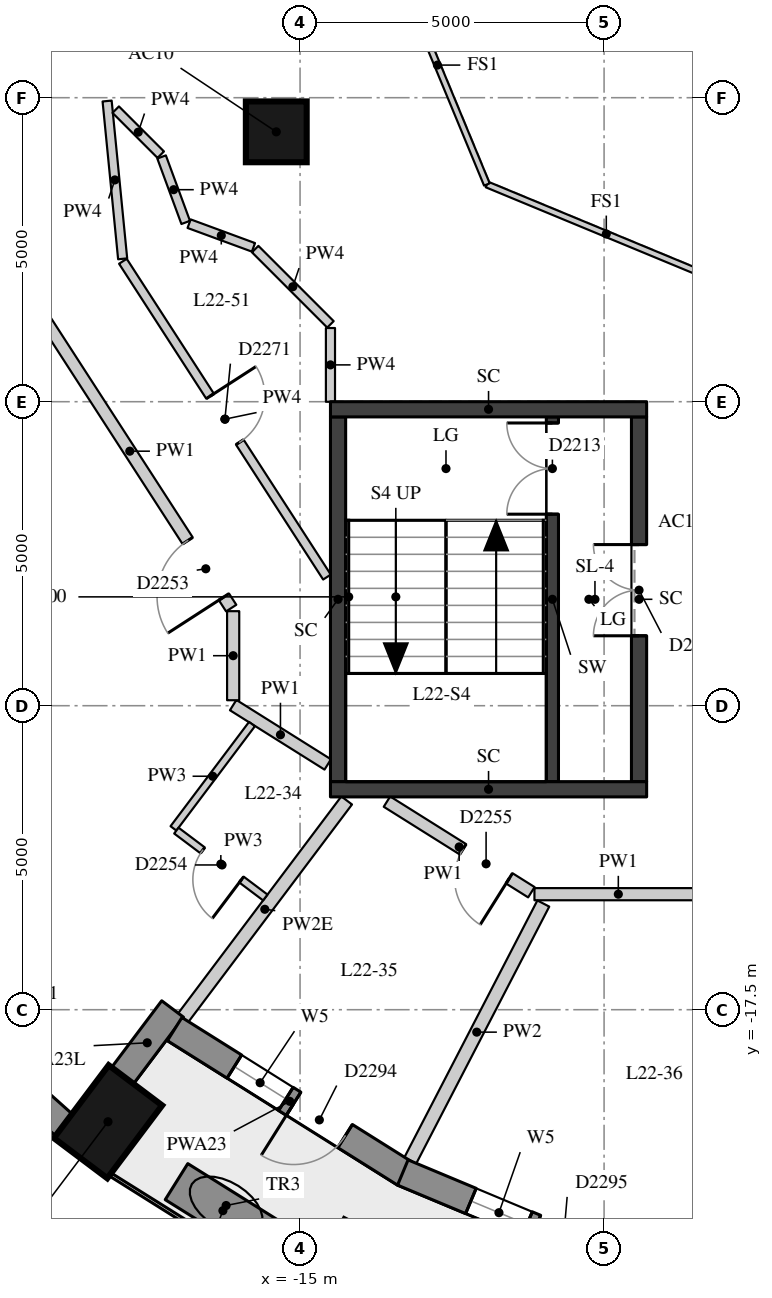
"""IFC4 building model, lengths in metres.
Left out: names, types, materials, properties, quantities, classifications, styles, units other than length and angle.
Written with IfcOpenShell. Run it as: python <this file> out.ifc"""

import sys

from ifc_helpers import new_model, si_unit, direction, frame, frame_2d, origin, origin_2d, place, context, subcontext, project, spatial, rectangle, extrude, element, fill, save


model = new_model("IFC4")
c1 = context("Model", 3, precision=1e-05, world=origin(), true_north=direction((0.0, 1.0)))
c2 = subcontext(c1, "Body", "Model", "MODEL_VIEW")
j1 = project(units=[si_unit("LENGTHUNIT", "METRE"), si_unit("PLANEANGLEUNIT", "RADIAN")], contexts=[c1])
p1 = place(None, origin())
s1 = spatial("IfcSite", under=j1, at=p1, CompositionType="ELEMENT")
p2 = place(p1, origin())
s2 = spatial("IfcBuilding", under=s1, at=p2, CompositionType="ELEMENT")
p3 = place(p2, frame((0.0, 0.0, 81.1)))
s3 = spatial("IfcBuildingStorey", under=s2, at=p3, CompositionType="ELEMENT", Elevation=81.1)
p4 = place(p3, frame((-18.159, -19.343, 0.0), z_axis=(0.0, 0.0, 1.0), x_axis=(-0.601173783055, -0.79911831575, 0.0)))
e1 = element("IfcColumn", 1, at=p4, inside=s3, PredefinedType="COLUMN", context=c2, shape_type="SweptSolid", body=[
    extrude(rectangle(XDim=1.5, YDim=1.1, at=origin_2d()), origin(), (0.0, 0.0, 1.0), 3.3),
])
p5 = place(p3, frame((-15.391, -3.062, 0.0), z_axis=(0.0, 0.0, 1.0), x_axis=(1.0, 0.0, 0.0)))
e2 = element("IfcColumn", 2, at=p5, inside=s3, PredefinedType="COLUMN", context=c2, shape_type="SweptSolid", body=[
    extrude(rectangle(XDim=1.0, YDim=1.0, at=origin_2d()), origin(), (0.0, 0.0, 1.0), 3.3),
])
p6 = place(p3, frame((-21.627, -16.943, 0.0), z_axis=(0.0, 0.0, 1.0), x_axis=(0.745526233716, -0.66647628228, 0.0)))
e3 = element("IfcWall", 3, at=p6, inside=s3, PredefinedType="SOLIDWALL", context=c2, shape_type="SweptSolid", body=[
    extrude(rectangle(XDim=3.697, YDim=0.45, at=frame_2d((1.848, 0.0))), origin(), (0.0, 0.0, 1.0), 2.85),
])
p7 = place(p6, frame((0.749, 0.0, 0.4)))
e4 = element("IfcOpeningElement", 4, at=p7, cuts=e3, PredefinedType="OPENING", context=c2, shape_type="SweptSolid", body=[
    extrude(rectangle(XDim=2.2, YDim=1.75, at=frame_2d((1.1, 0.875))), frame((0.0, 0.235, 0.0), z_axis=(0.0, -1.0, 0.0), x_axis=(1.0, 0.0, 0.0)), (0.0, 0.0, 1.0), 0.47),
])
p8 = place(p3, frame((-17.932, -18.6, 0.0), z_axis=(0.0, 0.0, 1.0), x_axis=(0.601262851241, 0.799051302306, 0.0)))
e5 = element("IfcWall", 5, at=p8, inside=s3, PredefinedType="SOLIDWALL", context=c2, shape_type="SweptSolid", body=[
    extrude(rectangle(XDim=1.391, YDim=0.45, at=frame_2d((0.696, 0.0))), origin(), (0.0, 0.0, 1.0), 2.4),
])
p9 = place(p3, frame((-17.062, -17.819, 0.0), z_axis=(0.0, 0.0, 1.0), x_axis=(0.846990101364, -0.531608660757, 0.0)))
e6 = element("IfcWall", 6, at=p9, inside=s3, PredefinedType="SOLIDWALL", context=c2, shape_type="SweptSolid", body=[
    extrude(rectangle(XDim=4.469, YDim=0.45, at=frame_2d((2.234, 0.0))), origin(), (0.0, 0.0, 1.0), 2.85),
])
p10 = place(p9, frame((1.159, 0.0, 0.4)))
e7 = element("IfcOpeningElement", 7, at=p10, cuts=e6, PredefinedType="OPENING", context=c2, shape_type="SweptSolid", body=[
    extrude(rectangle(XDim=1.0, YDim=1.75, at=frame_2d((0.5, 0.875))), frame((0.0, 0.235, 0.0), z_axis=(0.0, -1.0, 0.0), x_axis=(1.0, 0.0, 0.0)), (0.0, 0.0, 1.0), 0.47),
])
p11 = place(p9, frame((2.31, 0.0, 0.0)))
e8 = element("IfcOpeningElement", 8, at=p11, cuts=e6, PredefinedType="OPENING", context=c2, shape_type="SweptSolid", body=[
    extrude(rectangle(XDim=1.0, YDim=2.15, at=frame_2d((0.5, 1.075))), frame((0.0, 0.235, 0.0), z_axis=(0.0, -1.0, 0.0), x_axis=(1.0, 0.0, 0.0)), (0.0, 0.0, 1.0), 0.47),
])
p12 = place(p3, frame((-13.31, -20.178, 0.0), z_axis=(0.0, 0.0, 1.0), x_axis=(0.922634412489, -0.385675693935, 0.0)))
e9 = element("IfcWall", 9, at=p12, inside=s3, PredefinedType="SOLIDWALL", context=c2, shape_type="SweptSolid", body=[
    extrude(rectangle(XDim=4.577, YDim=0.45, at=frame_2d((2.288, 0.0))), origin(), (0.0, 0.0, 1.0), 2.85),
])
p13 = place(p12, frame((1.213, 0.0, 0.4)))
e10 = element("IfcOpeningElement", 10, at=p13, cuts=e9, PredefinedType="OPENING", context=c2, shape_type="SweptSolid", body=[
    extrude(rectangle(XDim=1.0, YDim=1.75, at=frame_2d((0.5, 0.875))), frame((0.0, 0.235, 0.0), z_axis=(0.0, -1.0, 0.0), x_axis=(1.0, 0.0, 0.0)), (0.0, 0.0, 1.0), 0.47),
])
p14 = place(p12, frame((2.363, 0.0, 0.0)))
e11 = element("IfcOpeningElement", 11, at=p14, cuts=e9, PredefinedType="OPENING", context=c2, shape_type="SweptSolid", body=[
    extrude(rectangle(XDim=1.0, YDim=2.15, at=frame_2d((0.5, 1.075))), frame((0.0, 0.235, 0.0), z_axis=(0.0, -1.0, 0.0), x_axis=(1.0, 0.0, 0.0)), (0.0, 0.0, 1.0), 0.47),
])
p15 = place(p3, frame((-17.032, -20.328, 0.0), z_axis=(0.0, 0.0, 1.0), x_axis=(0.847609446823, -0.530620604252, 0.0)))
e12 = element("IfcWall", 12, at=p15, inside=s3, PredefinedType="USERDEFINED", context=c2, shape_type="SweptSolid", body=[
    extrude(rectangle(XDim=1.8, YDim=0.7, at=frame_2d((0.9, 0.0))), origin(), (0.0, 0.0, 1.0), 0.75),
])
p16 = place(p3, frame((-10.85, -13.75, 0.0), z_axis=(0.0, 0.0, 1.0), x_axis=(0.0, 1.0, 0.0)))
e13 = element("IfcWall", 13, at=p16, inside=s3, PredefinedType="SHEAR", context=c2, shape_type="SweptSolid", body=[
    extrude(rectangle(XDim=6.0, YDim=0.2, at=frame_2d((3.0, 0.0))), origin(), (0.0, 0.0, 1.0), 2.85),
])
p17 = place(p16, frame((4.4, 0.0, 0.0)))
e14 = element("IfcOpeningElement", 14, at=p17, cuts=e13, PredefinedType="OPENING", context=c2, shape_type="SweptSolid", body=[
    extrude(rectangle(XDim=1.5, YDim=2.1, at=frame_2d((0.75, 1.05))), frame((0.0, 0.11, 0.0), z_axis=(0.0, -1.0, 0.0), x_axis=(1.0, 0.0, 0.0)), (0.0, 0.0, 1.0), 0.22),
])
p18 = place(p3, frame((-14.375, -13.75, -0.28), z_axis=(0.0, 0.0, 1.0), x_axis=(0.0, 1.0, 0.0)))
e15 = element("IfcWall", 15, at=p18, inside=s3, PredefinedType="SHEAR", context=c2, shape_type="SweptSolid", body=[
    extrude(rectangle(XDim=6.0, YDim=0.25, at=frame_2d((3.0, 0.0))), origin(), (0.0, 0.0, 1.0), 3.13),
])
p19 = place(p3, frame((-9.425, -13.75, -0.28), z_axis=(0.0, 0.0, 1.0), x_axis=(0.0, 1.0, 0.0)))
e16 = element("IfcWall", 16, at=p19, inside=s3, PredefinedType="SHEAR", context=c2, shape_type="SweptSolid", body=[
    extrude(rectangle(XDim=6.0, YDim=0.25, at=frame_2d((3.0, 0.0))), origin(), (0.0, 0.0, 1.0), 3.13),
])
p20 = place(p19, frame((2.4, 0.0, 0.28)))
e17 = element("IfcOpeningElement", 17, at=p20, cuts=e16, PredefinedType="OPENING", context=c2, shape_type="SweptSolid", body=[
    extrude(rectangle(XDim=1.5, YDim=2.1, at=frame_2d((0.75, 1.05))), frame((0.0, 0.135, 0.0), z_axis=(0.0, -1.0, 0.0), x_axis=(1.0, 0.0, 0.0)), (0.0, 0.0, 1.0), 0.27),
])
for number, where, z_axis, x_axis in (
    (18, (-14.5, -7.625, -0.28), (0.0, 0.0, 1.0), (1.0, 0.0, 0.0)),
    (19, (-14.5, -13.875, -0.28), (0.0, 0.0, 1.0), (1.0, 0.0, 0.0)),
):
    element("IfcWall", number, at=place(p3, frame(where, z_axis=z_axis, x_axis=x_axis)), inside=s3, PredefinedType="SHEAR", context=c2, shape_type="SweptSolid", body=[
        extrude(rectangle(XDim=5.2, YDim=0.25, at=frame_2d((2.6, 0.0))), origin(), (0.0, 0.0, 1.0), 3.13),
    ])
p21 = place(p3, frame((-14.545, -13.466, 0.0), z_axis=(0.0, 0.0, 1.0), x_axis=(-0.846973518375, 0.531635080832, 0.0)))
e20 = element("IfcWall", 20, at=p21, inside=s3, PredefinedType="PARTITIONING", context=c2, shape_type="SweptSolid", body=[
    extrude(rectangle(XDim=1.836, YDim=0.2, at=frame_2d((0.918, 0.0))), origin(), (0.0, 0.0, 1.0), 2.85),
])
p22 = place(p3, frame((-16.1, -12.41, 0.0), z_axis=(0.0, 0.0, 1.0), x_axis=(0.0, 1.0, 0.0)))
e21 = element("IfcWall", 21, at=p22, inside=s3, PredefinedType="PARTITIONING", context=c2, shape_type="SweptSolid", body=[
    extrude(rectangle(XDim=1.465, YDim=0.2, at=frame_2d((0.732, 0.0))), origin(), (0.0, 0.0, 1.0), 2.85),
])
p23 = place(p3, frame((-16.132, -10.895, 0.0), z_axis=(0.0, 0.0, 1.0), x_axis=(-0.54275375647, 0.839891873897, 0.0)))
e22 = element("IfcWall", 22, at=p23, inside=s3, PredefinedType="PARTITIONING", context=c2, shape_type="SweptSolid", body=[
    extrude(rectangle(XDim=6.146, YDim=0.2, at=frame_2d((3.073, 0.0))), origin(), (0.0, 0.0, 1.0), 2.85),
])
p24 = place(p23, frame((0.22, 0.0, 0.0)))
e23 = element("IfcOpeningElement", 23, at=p24, cuts=e22, PredefinedType="OPENING", context=c2, shape_type="SweptSolid", body=[
    extrude(rectangle(XDim=1.1, YDim=2.1, at=frame_2d((0.55, 1.05))), frame((0.0, 0.11, 0.0), z_axis=(0.0, -1.0, 0.0), x_axis=(1.0, 0.0, 0.0)), (0.0, 0.0, 1.0), 0.22),
])
p25 = place(p3, frame((-8.386, -15.6, 0.0), z_axis=(0.0, 0.0, 1.0), x_axis=(-1.0, 0.0, 0.0)))
e24 = element("IfcWall", 24, at=p25, inside=s3, PredefinedType="PARTITIONING", context=c2, shape_type="SweptSolid", body=[
    extrude(rectangle(XDim=2.759, YDim=0.2, at=frame_2d((1.379, 0.0))), origin(), (0.0, 0.0, 1.0), 2.85),
])
p26 = place(p3, frame((-11.196, -15.568, 0.0), z_axis=(0.0, 0.0, 1.0), x_axis=(-0.847018542882, 0.531563343369, 0.0)))
e25 = element("IfcWall", 25, at=p26, inside=s3, PredefinedType="PARTITIONING", context=c2, shape_type="SweptSolid", body=[
    extrude(rectangle(XDim=2.804, YDim=0.2, at=frame_2d((1.402, 0.0))), origin(), (0.0, 0.0, 1.0), 2.85),
])
p27 = place(p26, frame((0.429, 0.0, 0.0)))
e26 = element("IfcOpeningElement", 26, at=p27, cuts=e25, PredefinedType="OPENING", context=c2, shape_type="SweptSolid", body=[
    extrude(rectangle(XDim=0.9, YDim=2.1, at=frame_2d((0.45, 1.05))), frame((0.0, 0.11, 0.0), z_axis=(0.0, -1.0, 0.0), x_axis=(1.0, 0.0, 0.0)), (0.0, 0.0, 1.0), 0.22),
])
p28 = place(p3, frame((-14.557, -10.384, 0.0), z_axis=(0.0, 0.0, 1.0), x_axis=(-0.542717528168, 0.839915284192, 0.0)))
e27 = element("IfcWall", 27, at=p28, inside=s3, PredefinedType="PARTITIONING", context=c2, shape_type="SweptSolid", body=[
    extrude(rectangle(XDim=6.184, YDim=0.15, at=frame_2d((3.092, 0.0))), origin(), (0.0, 0.0, 1.0), 2.85),
])
p29 = place(p28, frame((2.642, 0.0, 0.0)))
e28 = element("IfcOpeningElement", 28, at=p29, cuts=e27, PredefinedType="OPENING", context=c2, shape_type="SweptSolid", body=[
    extrude(rectangle(XDim=0.9, YDim=2.1, at=frame_2d((0.45, 1.05))), frame((0.0, 0.085, 0.0), z_axis=(0.0, -1.0, 0.0), x_axis=(1.0, 0.0, 0.0)), (0.0, 0.0, 1.0), 0.17),
])
p30 = place(p3, frame((-17.917, -5.15, 0.0), z_axis=(0.0, 0.0, 1.0), x_axis=(-0.098011382053, 0.995185293796, 0.0)))
e29 = element("IfcWall", 29, at=p30, inside=s3, PredefinedType="PARTITIONING", context=c2, shape_type="SweptSolid", body=[
    extrude(rectangle(XDim=2.608, YDim=0.15, at=frame_2d((1.304, 0.0))), origin(), (0.0, 0.0, 1.0), 2.85),
])
p31 = place(p3, frame((-18.031, -2.696, 0.0), z_axis=(0.0, 0.0, 1.0), x_axis=(0.706990221924, -0.707223321239, 0.0)))
e30 = element("IfcWall", 30, at=p31, inside=s3, PredefinedType="PARTITIONING", context=c2, shape_type="SweptSolid", body=[
    extrude(rectangle(XDim=1.047, YDim=0.15, at=frame_2d((0.524, 0.0))), origin(), (0.0, 0.0, 1.0), 2.85),
])
p32 = place(p3, frame((-17.277, -3.475, 0.0), z_axis=(0.0, 0.0, 1.0), x_axis=(0.345498312946, -0.938419370938, 0.0)))
e31 = element("IfcWall", 31, at=p32, inside=s3, PredefinedType="PARTITIONING", context=c2, shape_type="SweptSolid", body=[
    extrude(rectangle(XDim=1.147, YDim=0.15, at=frame_2d((0.574, 0.0))), origin(), (0.0, 0.0, 1.0), 2.85),
])
p33 = place(p3, frame((-16.824, -4.572, 0.0), z_axis=(0.0, 0.0, 1.0), x_axis=(0.938465057683, -0.345374196355, 0.0)))
e32 = element("IfcWall", 32, at=p33, inside=s3, PredefinedType="PARTITIONING", context=c2, shape_type="SweptSolid", body=[
    extrude(rectangle(XDim=1.127, YDim=0.15, at=frame_2d((0.564, 0.0))), origin(), (0.0, 0.0, 1.0), 2.85),
])
p34 = place(p3, frame((-15.738, -4.99, 0.0), z_axis=(0.0, 0.0, 1.0), x_axis=(0.707037063979, -0.707176491521, 0.0)))
e33 = element("IfcWall", 33, at=p34, inside=s3, PredefinedType="PARTITIONING", context=c2, shape_type="SweptSolid", body=[
    extrude(rectangle(XDim=1.751, YDim=0.15, at=frame_2d((0.875, 0.0))), origin(), (0.0, 0.0, 1.0), 2.85),
])
p35 = place(p3, frame((-14.5, -6.288, 0.0), z_axis=(0.0, 0.0, 1.0), x_axis=(0.0, -1.0, 0.0)))
e34 = element("IfcWall", 34, at=p35, inside=s3, PredefinedType="PARTITIONING", context=c2, shape_type="SweptSolid", body=[
    extrude(rectangle(XDim=1.213, YDim=0.15, at=frame_2d((0.606, 0.0))), origin(), (0.0, 0.0, 1.0), 2.85),
])
p36 = place(p3, frame((-16.927, -17.638, 0.0), z_axis=(0.0, 0.0, 1.0), x_axis=(0.601158965663, 0.799129462605, 0.0)))
e35 = element("IfcWall", 35, at=p36, inside=s3, PredefinedType="PARTITIONING", context=c2, shape_type="SweptSolid", body=[
    extrude(rectangle(XDim=4.48, YDim=0.22, at=frame_2d((2.24, 0.0))), origin(), (0.0, 0.0, 1.0), 2.4),
])
p37 = place(p3, frame((-13.189, -19.984, 0.0), z_axis=(0.0, 0.0, 1.0), x_axis=(0.459694761863, 0.888076981976, 0.0)))
e36 = element("IfcWall", 36, at=p37, inside=s3, PredefinedType="PARTITIONING", context=c2, shape_type="SweptSolid", body=[
    extrude(rectangle(XDim=4.764, YDim=0.22, at=frame_2d((2.382, 0.0))), origin(), (0.0, 0.0, 1.0), 2.85),
])
p38 = place(p3, frame((-15.791, -12.802, 0.0), z_axis=(0.0, 0.0, 1.0), x_axis=(-0.601308910174, -0.79901664222, 0.0)))
e37 = element("IfcWall", 37, at=p38, inside=s3, PredefinedType="PARTITIONING", context=c2, shape_type="SweptSolid", body=[
    extrude(rectangle(XDim=2.147, YDim=0.12, at=frame_2d((1.074, 0.0))), origin(), (0.0, 0.0, 1.0), 2.85),
])
p39 = place(p3, frame((-17.034, -14.554, 0.0), z_axis=(0.0, 0.0, 1.0), x_axis=(0.799182868338, -0.601087966071, 0.0)))
e38 = element("IfcWall", 38, at=p39, inside=s3, PredefinedType="PARTITIONING", context=c2, shape_type="SweptSolid", body=[
    extrude(rectangle(XDim=1.83, YDim=0.12, at=frame_2d((0.915, 0.0))), origin(), (0.0, 0.0, 1.0), 2.85),
])
p40 = place(p39, frame((0.54, 0.0, 0.0)))
e39 = element("IfcOpeningElement", 39, at=p40, cuts=e38, PredefinedType="OPENING", context=c2, shape_type="SweptSolid", body=[
    extrude(rectangle(XDim=0.8, YDim=2.1, at=frame_2d((0.4, 1.05))), frame((0.0, 0.07, 0.0), z_axis=(0.0, -1.0, 0.0), x_axis=(1.0, 0.0, 0.0)), (0.0, 0.0, 1.0), 0.14),
])
for number, where, z_axis, x_axis in (
    (40, (-8.0, -5.554, 0.0), (0.0, 0.0, 1.0), (-0.924, 0.383, 0.0)),
    (41, (-11.927, -3.927, 0.0), (0.0, 0.0, 1.0), (-0.383, 0.924, 0.0)),
):
    element("IfcWall", number, at=place(p3, frame(where, z_axis=z_axis, x_axis=x_axis)), inside=s3, PredefinedType="PARTITIONING", context=c2, shape_type="SweptSolid", body=[
        extrude(rectangle(XDim=4.251, YDim=0.1, at=frame_2d((2.125, 0.0))), origin(), (0.0, 0.0, 1.0), 2.85),
    ])
p41 = place(p10, origin())
e42 = element("IfcWindow", 42, at=p41, inside=s3, PartitioningType="SINGLE_PANEL", PredefinedType="WINDOW", context=c2, shape_type="SweptSolid", body=[
    extrude(rectangle(XDim=1.0, YDim=1.75, at=frame_2d((0.5, 0.875))), frame((0.0, 0.035, 0.0), z_axis=(0.0, -1.0, 0.0), x_axis=(1.0, 0.0, 0.0)), (0.0, 0.0, 1.0), 0.06),
])
fill(e7, e42)
p42 = place(p11, frame((1.0, 0.0, 0.0), z_axis=(0.0, 0.0, 1.0), x_axis=(-1.0, 0.0, 0.0)))
e43 = element("IfcDoor", 43, at=p42, inside=s3, OperationType="SINGLE_SWING_RIGHT", PredefinedType="DOOR", context=c2, shape_type="SweptSolid", body=[
    extrude(rectangle(XDim=1.0, YDim=2.15, at=frame_2d((0.5, 1.075))), frame((0.0, 0.075, 0.0), z_axis=(0.0, -1.0, 0.0), x_axis=(1.0, 0.0, 0.0)), (0.0, 0.0, 1.0), 0.05),
])
fill(e8, e43)
p43 = place(p13, origin())
e44 = element("IfcWindow", 44, at=p43, inside=s3, PartitioningType="SINGLE_PANEL", PredefinedType="WINDOW", context=c2, shape_type="SweptSolid", body=[
    extrude(rectangle(XDim=1.0, YDim=1.75, at=frame_2d((0.5, 0.875))), frame((0.0, 0.035, 0.0), z_axis=(0.0, -1.0, 0.0), x_axis=(1.0, 0.0, 0.0)), (0.0, 0.0, 1.0), 0.06),
])
fill(e10, e44)
p44 = place(p17, origin())
e45 = element("IfcDoor", 45, at=p44, inside=s3, OperationType="DOUBLE_DOOR_SINGLE_SWING", PredefinedType="DOOR", context=c2, shape_type="SweptSolid", body=[
    extrude(rectangle(XDim=1.5, YDim=2.1, at=frame_2d((0.75, 1.05))), frame((0.0, 0.025, 0.0), z_axis=(0.0, -1.0, 0.0), x_axis=(1.0, 0.0, 0.0)), (0.0, 0.0, 1.0), 0.05),
])
fill(e14, e45)
p45 = place(p20, origin())
e46 = element("IfcDoor", 46, at=p45, inside=s3, OperationType="DOUBLE_DOOR_SINGLE_SWING", PredefinedType="DOOR", context=c2, shape_type="SweptSolid", body=[
    extrude(rectangle(XDim=1.5, YDim=2.1, at=frame_2d((0.75, 1.05))), frame((0.0, 0.025, 0.0), z_axis=(0.0, -1.0, 0.0), x_axis=(1.0, 0.0, 0.0)), (0.0, 0.0, 1.0), 0.05),
])
fill(e17, e46)
p46 = place(p24, origin())
e47 = element("IfcDoor", 47, at=p46, inside=s3, OperationType="SINGLE_SWING_LEFT", PredefinedType="DOOR", context=c2, shape_type="SweptSolid", body=[
    extrude(rectangle(XDim=1.1, YDim=2.1, at=frame_2d((0.55, 1.05))), frame((0.0, 0.025, 0.0), z_axis=(0.0, -1.0, 0.0), x_axis=(1.0, 0.0, 0.0)), (0.0, 0.0, 1.0), 0.05),
])
fill(e23, e47)
p47 = place(p40, origin())
e48 = element("IfcDoor", 48, at=p47, inside=s3, OperationType="SINGLE_SWING_LEFT", PredefinedType="DOOR", context=c2, shape_type="SweptSolid", body=[
    extrude(rectangle(XDim=0.8, YDim=2.1, at=frame_2d((0.4, 1.05))), frame((0.0, 0.025, 0.0), z_axis=(0.0, -1.0, 0.0), x_axis=(1.0, 0.0, 0.0)), (0.0, 0.0, 1.0), 0.05),
])
fill(e39, e48)
p48 = place(p27, origin())
e49 = element("IfcDoor", 49, at=p48, inside=s3, OperationType="SINGLE_SWING_LEFT", PredefinedType="DOOR", context=c2, shape_type="SweptSolid", body=[
    extrude(rectangle(XDim=0.9, YDim=2.1, at=frame_2d((0.45, 1.05))), frame((0.0, 0.025, 0.0), z_axis=(0.0, -1.0, 0.0), x_axis=(1.0, 0.0, 0.0)), (0.0, 0.0, 1.0), 0.05),
])
fill(e26, e49)
p49 = place(p29, origin())
e50 = element("IfcDoor", 50, at=p49, inside=s3, OperationType="SINGLE_SWING_LEFT", PredefinedType="DOOR", context=c2, shape_type="SweptSolid", body=[
    extrude(rectangle(XDim=0.9, YDim=2.1, at=frame_2d((0.45, 1.05))), frame((0.0, 0.025, 0.0), z_axis=(0.0, -1.0, 0.0), x_axis=(1.0, 0.0, 0.0)), (0.0, 0.0, 1.0), 0.05),
])
fill(e28, e50)
save(model, sys.argv[1])
